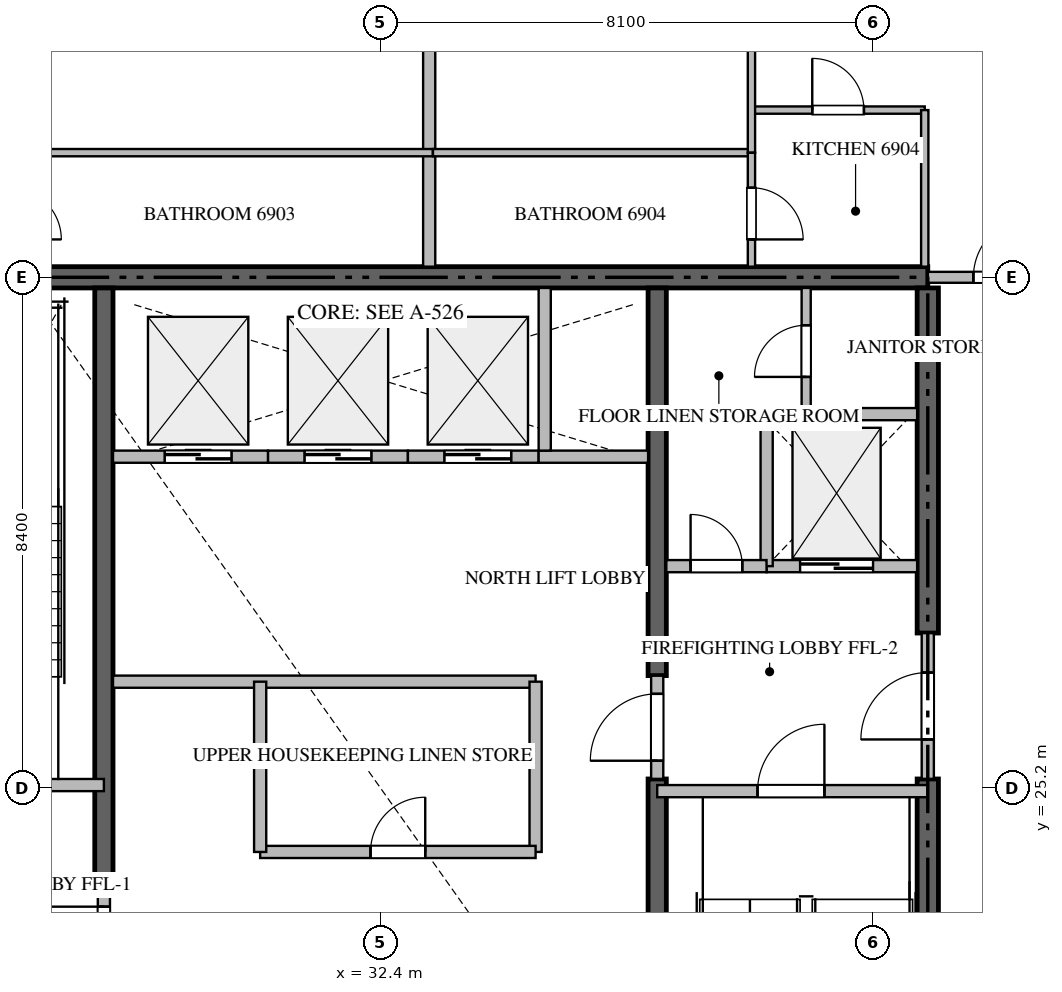
"""IFC4 building model, lengths in metres.
Left out: names, types, materials, properties, quantities, classifications, styles, units other than length and angle.
Written with IfcOpenShell. Run it as: python <this file> out.ifc"""

import sys

from ifc_helpers import new_model, si_unit, direction, frame, frame_2d, origin, place, context, subcontext, project, spatial, rectangle, extrude, source, transform, mapped, element, fill, save


model = new_model("IFC4")
c1 = context("Model", 3, precision=1e-05, world=origin(), true_north=direction((0.0, 1.0)))
c2 = subcontext(c1, "Body", "Model", "MODEL_VIEW")
j1 = project(units=[si_unit("LENGTHUNIT", "METRE"), si_unit("PLANEANGLEUNIT", "RADIAN")], contexts=[c1])
p1 = place(None, origin())
s1 = spatial("IfcSite", under=j1, at=p1, CompositionType="ELEMENT")
p2 = place(p1, origin())
s2 = spatial("IfcBuilding", under=s1, at=p2, CompositionType="ELEMENT")
p3 = place(p2, frame((0.0, 0.0, 275.9)))
s3 = spatial("IfcBuildingStorey", under=s2, at=p3, CompositionType="ELEMENT", Elevation=275.9)
p4 = place(p3, frame((41.4, 33.6, -0.26), z_axis=(0.0, 0.0, 1.0), x_axis=(-1.0, 0.0, 0.0)))
e1 = element("IfcWall", 1, at=p4, inside=s3, PredefinedType="SHEAR", context=c2, shape_type="SweptSolid", body=[
    extrude(rectangle(XDim=18.0, YDim=0.35, at=frame_2d((9.0, 0.0))), origin(), (0.0, 0.0, 1.0), 3.848),
])
p5 = place(p3, frame((41.4, 16.975, -0.26), z_axis=(0.0, 0.0, 1.0), x_axis=(0.0, 1.0, 0.0)))
e2 = element("IfcWall", 2, at=p5, inside=s3, PredefinedType="SHEAR", context=c2, shape_type="SweptSolid", body=[
    extrude(rectangle(XDim=8.375, YDim=0.35, at=frame_2d((4.188, 0.0))), origin(), (0.0, 0.0, 1.0), 3.848),
])
p6 = place(p3, frame((41.4, 27.75, -0.26), z_axis=(0.0, 0.0, 1.0), x_axis=(0.0, 1.0, 0.0)))
e3 = element("IfcWall", 3, at=p6, inside=s3, PredefinedType="SHEAR", context=c2, shape_type="SweptSolid", body=[
    extrude(rectangle(XDim=5.675, YDim=0.35, at=frame_2d((2.837, 0.0))), origin(), (0.0, 0.0, 1.0), 3.848),
])
p7 = place(p3, frame((27.85, 23.55, -0.26), z_axis=(0.0, 0.0, 1.0), x_axis=(0.0, 1.0, 0.0)))
e4 = element("IfcWall", 4, at=p7, inside=s3, PredefinedType="SHEAR", context=c2, shape_type="SweptSolid", body=[
    extrude(rectangle(XDim=9.875, YDim=0.3, at=frame_2d((4.938, 0.0))), origin(), (0.0, 0.0, 1.0), 3.848),
])
p8 = place(p3, frame((36.95, 16.975, -0.26), z_axis=(0.0, 0.0, 1.0), x_axis=(0.0, 1.0, 0.0)))
e5 = element("IfcWall", 5, at=p8, inside=s3, PredefinedType="SHEAR", context=c2, shape_type="SweptSolid", body=[
    extrude(rectangle(XDim=8.375, YDim=0.3, at=frame_2d((4.188, 0.0))), origin(), (0.0, 0.0, 1.0), 3.848),
])
p9 = place(p3, frame((36.95, 27.05, -0.26), z_axis=(0.0, 0.0, 1.0), x_axis=(0.0, 1.0, 0.0)))
e6 = element("IfcWall", 6, at=p9, inside=s3, PredefinedType="SHEAR", context=c2, shape_type="SweptSolid", body=[
    extrude(rectangle(XDim=6.375, YDim=0.3, at=frame_2d((3.188, 0.0))), origin(), (0.0, 0.0, 1.0), 3.848),
])
p10 = place(p3, frame((23.4, 25.25, 0.0), z_axis=(0.0, 0.0, 1.0), x_axis=(1.0, 0.0, 0.0)))
e7 = element("IfcWall", 7, at=p10, inside=s3, PredefinedType="STANDARD", context=c2, shape_type="SweptSolid", body=[
    extrude(rectangle(XDim=4.45, YDim=0.2, at=frame_2d((2.225, 0.0))), origin(), (0.0, 0.0, 1.0), 3.59),
])
p11 = place(p10, frame((1.65, 0.0, 0.0)))
e8 = element("IfcOpeningElement", 8, at=p11, cuts=e7, PredefinedType="OPENING", context=c2, shape_type="SweptSolid", body=[
    extrude(rectangle(XDim=1.1, YDim=2.15, at=frame_2d((0.55, 1.075))), frame((0.0, 0.11, 0.0), z_axis=(0.0, -1.0, 0.0), x_axis=(1.0, 0.0, 0.0)), (0.0, 0.0, 1.0), 0.22),
])
p12 = place(p3, frame((36.95, 25.15, 0.0), z_axis=(0.0, 0.0, 1.0), x_axis=(1.0, 0.0, 0.0)))
e9 = element("IfcWall", 9, at=p12, inside=s3, PredefinedType="STANDARD", context=c2, shape_type="SweptSolid", body=[
    extrude(rectangle(XDim=4.45, YDim=0.2, at=frame_2d((2.225, 0.0))), origin(), (0.0, 0.0, 1.0), 3.59),
])
p13 = place(p12, frame((1.65, 0.0, 0.0)))
e10 = element("IfcOpeningElement", 10, at=p13, cuts=e9, PredefinedType="OPENING", context=c2, shape_type="SweptSolid", body=[
    extrude(rectangle(XDim=1.1, YDim=2.15, at=frame_2d((0.55, 1.075))), frame((0.0, 0.11, 0.0), z_axis=(0.0, -1.0, 0.0), x_axis=(1.0, 0.0, 0.0)), (0.0, 0.0, 1.0), 0.22),
])
p14 = place(p3, frame((38.75, 28.85, 0.0), z_axis=(0.0, 0.0, 1.0), x_axis=(1.0, 0.0, 0.0)))
e11 = element("IfcWall", 11, at=p14, inside=s3, PredefinedType="STANDARD", context=c2, shape_type="SweptSolid", body=[
    extrude(rectangle(XDim=2.475, YDim=0.2, at=frame_2d((1.238, 0.0))), origin(), (0.0, 0.0, 1.0), 3.59),
])
p15 = place(p14, frame((0.55, 0.0, 0.0)))
e12 = element("IfcOpeningElement", 12, at=p15, cuts=e11, PredefinedType="OPENING", context=c2, shape_type="SweptSolid", body=[
    extrude(rectangle(XDim=1.2, YDim=2.2, at=frame_2d((0.6, 1.1))), frame((0.0, 0.11, 0.0), z_axis=(0.0, -1.0, 0.0), x_axis=(1.0, 0.0, 0.0)), (0.0, 0.0, 1.0), 0.22),
])
p16 = place(p3, frame((28.0, 30.65, 0.0), z_axis=(0.0, 0.0, 1.0), x_axis=(1.0, 0.0, 0.0)))
e13 = element("IfcWall", 13, at=p16, inside=s3, PredefinedType="STANDARD", context=c2, shape_type="SweptSolid", body=[
    extrude(rectangle(XDim=2.55, YDim=0.2, at=frame_2d((1.275, 0.0))), origin(), (0.0, 0.0, 1.0), 3.59),
])
p17 = place(p16, frame((0.85, 0.0, 0.0)))
e14 = element("IfcOpeningElement", 14, at=p17, cuts=e13, PredefinedType="OPENING", context=c2, shape_type="SweptSolid", body=[
    extrude(rectangle(XDim=1.1, YDim=2.2, at=frame_2d((0.55, 1.1))), frame((0.0, 0.11, 0.0), z_axis=(0.0, -1.0, 0.0), x_axis=(1.0, 0.0, 0.0)), (0.0, 0.0, 1.0), 0.22),
])
p18 = place(p3, frame((30.55, 30.65, 0.0), z_axis=(0.0, 0.0, 1.0), x_axis=(1.0, 0.0, 0.0)))
e15 = element("IfcWall", 15, at=p18, inside=s3, PredefinedType="STANDARD", context=c2, shape_type="SweptSolid", body=[
    extrude(rectangle(XDim=2.3, YDim=0.2, at=frame_2d((1.15, 0.0))), origin(), (0.0, 0.0, 1.0), 3.59),
])
p19 = place(p18, frame((0.6, 0.0, 0.0)))
e16 = element("IfcOpeningElement", 16, at=p19, cuts=e15, PredefinedType="OPENING", context=c2, shape_type="SweptSolid", body=[
    extrude(rectangle(XDim=1.1, YDim=2.2, at=frame_2d((0.55, 1.1))), frame((0.0, 0.11, 0.0), z_axis=(0.0, -1.0, 0.0), x_axis=(1.0, 0.0, 0.0)), (0.0, 0.0, 1.0), 0.22),
])
p20 = place(p3, frame((32.85, 30.65, 0.0), z_axis=(0.0, 0.0, 1.0), x_axis=(1.0, 0.0, 0.0)))
e17 = element("IfcWall", 17, at=p20, inside=s3, PredefinedType="STANDARD", context=c2, shape_type="SweptSolid", body=[
    extrude(rectangle(XDim=2.15, YDim=0.2, at=frame_2d((1.075, 0.0))), origin(), (0.0, 0.0, 1.0), 3.59),
])
p21 = place(p20, frame((0.6, 0.0, 0.0)))
e18 = element("IfcOpeningElement", 18, at=p21, cuts=e17, PredefinedType="OPENING", context=c2, shape_type="SweptSolid", body=[
    extrude(rectangle(XDim=1.1, YDim=2.2, at=frame_2d((0.55, 1.1))), frame((0.0, 0.11, 0.0), z_axis=(0.0, -1.0, 0.0), x_axis=(1.0, 0.0, 0.0)), (0.0, 0.0, 1.0), 0.22),
])
p22 = place(p3, frame((35.0, 30.65, 0.0), z_axis=(0.0, 0.0, 1.0), x_axis=(1.0, 0.0, 0.0)))
e19 = element("IfcWall", 19, at=p22, inside=s3, PredefinedType="STANDARD", context=c2, shape_type="SweptSolid", body=[
    extrude(rectangle(XDim=1.8, YDim=0.2, at=frame_2d((0.9, 0.0))), origin(), (0.0, 0.0, 1.0), 3.59),
])
p23 = place(p3, frame((35.1, 30.75, 0.0), z_axis=(0.0, 0.0, 1.0), x_axis=(0.0, 1.0, 0.0)))
e20 = element("IfcWall", 20, at=p23, inside=s3, PredefinedType="STANDARD", context=c2, shape_type="SweptSolid", body=[
    extrude(rectangle(XDim=2.675, YDim=0.2, at=frame_2d((1.337, 0.0))), origin(), (0.0, 0.0, 1.0), 3.59),
])
p24 = place(p3, frame((38.75, 28.85, 0.0), z_axis=(0.0, 0.0, 1.0), x_axis=(0.0, 1.0, 0.0)))
e21 = element("IfcWall", 21, at=p24, inside=s3, PredefinedType="STANDARD", context=c2, shape_type="SweptSolid", body=[
    extrude(rectangle(XDim=2.5, YDim=0.2, at=frame_2d((1.25, 0.0))), origin(), (0.0, 0.0, 1.0), 3.59),
])
p25 = place(p3, frame((38.75, 31.35, 0.0), z_axis=(0.0, 0.0, 1.0), x_axis=(1.0, 0.0, 0.0)))
e22 = element("IfcWall", 22, at=p25, inside=s3, PredefinedType="STANDARD", context=c2, shape_type="SweptSolid", body=[
    extrude(rectangle(XDim=2.475, YDim=0.2, at=frame_2d((1.238, 0.0))), origin(), (0.0, 0.0, 1.0), 3.59),
])
p26 = place(p3, frame((37.1, 28.85, 0.0), z_axis=(0.0, 0.0, 1.0), x_axis=(1.0, 0.0, 0.0)))
e23 = element("IfcWall", 23, at=p26, inside=s3, PredefinedType="STANDARD", context=c2, shape_type="SweptSolid", body=[
    extrude(rectangle(XDim=1.648, YDim=0.2, at=frame_2d((0.824, 0.0))), origin(), (0.0, 0.0, 1.0), 3.59),
])
p27 = place(p26, frame((0.399, 0.0, 0.0)))
e24 = element("IfcOpeningElement", 24, at=p27, cuts=e23, PredefinedType="OPENING", context=c2, shape_type="SweptSolid", body=[
    extrude(rectangle(XDim=0.85, YDim=2.1, at=frame_2d((0.425, 1.05))), frame((0.0, 0.11, 0.0), z_axis=(0.0, -1.0, 0.0), x_axis=(1.0, 0.0, 0.0)), (0.0, 0.0, 1.0), 0.22),
])
p28 = place(p3, frame((41.4, 25.352, 0.0), z_axis=(0.0, 0.0, 1.0), x_axis=(0.0, 1.0, 0.0)))
e25 = element("IfcWall", 25, at=p28, inside=s3, PredefinedType="STANDARD", context=c2, shape_type="SweptSolid", body=[
    extrude(rectangle(XDim=2.396, YDim=0.2, at=frame_2d((1.198, 0.0))), origin(), (0.0, 0.0, 1.0), 3.59),
])
p29 = place(p28, frame((0.648, 0.0, 0.0)))
e26 = element("IfcOpeningElement", 26, at=p29, cuts=e25, PredefinedType="OPENING", context=c2, shape_type="SweptSolid", body=[
    extrude(rectangle(XDim=1.1, YDim=2.15, at=frame_2d((0.55, 1.075))), frame((0.0, 0.11, 0.0), z_axis=(0.0, -1.0, 0.0), x_axis=(1.0, 0.0, 0.0)), (0.0, 0.0, 1.0), 0.22),
])
p30 = place(p3, frame((27.85, 21.852, 0.0), z_axis=(0.0, 0.0, 1.0), x_axis=(0.0, 1.0, 0.0)))
e27 = element("IfcWall", 27, at=p30, inside=s3, PredefinedType="STANDARD", context=c2, shape_type="SweptSolid", body=[
    extrude(rectangle(XDim=1.696, YDim=0.2, at=frame_2d((0.848, 0.0))), origin(), (0.0, 0.0, 1.0), 3.59),
])
p31 = place(p30, frame((0.298, 0.0, 0.0)))
e28 = element("IfcOpeningElement", 28, at=p31, cuts=e27, PredefinedType="OPENING", context=c2, shape_type="SweptSolid", body=[
    extrude(rectangle(XDim=1.1, YDim=2.15, at=frame_2d((0.55, 1.075))), frame((0.0, 0.11, 0.0), z_axis=(0.0, -1.0, 0.0), x_axis=(1.0, 0.0, 0.0)), (0.0, 0.0, 1.0), 0.22),
])
p32 = place(p3, frame((36.95, 25.352, 0.0), z_axis=(0.0, 0.0, 1.0), x_axis=(0.0, 1.0, 0.0)))
e29 = element("IfcWall", 29, at=p32, inside=s3, PredefinedType="STANDARD", context=c2, shape_type="SweptSolid", body=[
    extrude(rectangle(XDim=1.696, YDim=0.2, at=frame_2d((0.848, 0.0))), origin(), (0.0, 0.0, 1.0), 3.59),
])
p33 = place(p32, frame((0.298, 0.0, 0.0)))
e30 = element("IfcOpeningElement", 30, at=p33, cuts=e29, PredefinedType="OPENING", context=c2, shape_type="SweptSolid", body=[
    extrude(rectangle(XDim=1.1, YDim=2.15, at=frame_2d((0.55, 1.075))), frame((0.0, 0.11, 0.0), z_axis=(0.0, -1.0, 0.0), x_axis=(1.0, 0.0, 0.0)), (0.0, 0.0, 1.0), 0.22),
])
p34 = place(p3, frame((39.4, 31.35, 0.0), z_axis=(0.0, 0.0, 1.0), x_axis=(0.0, 1.0, 0.0)))
e31 = element("IfcWall", 31, at=p34, inside=s3, PredefinedType="PARTITIONING", context=c2, shape_type="SweptSolid", body=[
    extrude(rectangle(XDim=2.075, YDim=0.15, at=frame_2d((1.038, 0.0))), origin(), (0.0, 0.0, 1.0), 3.59),
])
p35 = place(p34, frame((0.612, 0.0, 0.0)))
e32 = element("IfcOpeningElement", 32, at=p35, cuts=e31, PredefinedType="OPENING", context=c2, shape_type="SweptSolid", body=[
    extrude(rectangle(XDim=0.85, YDim=2.1, at=frame_2d((0.425, 1.05))), frame((0.0, 0.085, 0.0), z_axis=(0.0, -1.0, 0.0), x_axis=(1.0, 0.0, 0.0)), (0.0, 0.0, 1.0), 0.17),
])
p36 = place(p3, frame((28.0, 26.95, 0.0), z_axis=(0.0, 0.0, 1.0), x_axis=(1.0, 0.0, 0.0)))
e33 = element("IfcWall", 33, at=p36, inside=s3, PredefinedType="STANDARD", context=c2, shape_type="SweptSolid", body=[
    extrude(rectangle(XDim=6.95, YDim=0.2, at=frame_2d((3.475, 0.0))), origin(), (0.0, 0.0, 1.0), 3.59),
])
p37 = place(p3, frame((34.95, 24.15, 0.0), z_axis=(0.0, 0.0, 1.0), x_axis=(0.0, 1.0, 0.0)))
e34 = element("IfcWall", 34, at=p37, inside=s3, PredefinedType="STANDARD", context=c2, shape_type="SweptSolid", body=[
    extrude(rectangle(XDim=2.8, YDim=0.2, at=frame_2d((1.4, 0.0))), origin(), (0.0, 0.0, 1.0), 3.59),
])
p38 = place(p3, frame((30.42, 24.15, 0.0), z_axis=(0.0, 0.0, 1.0), x_axis=(1.0, 0.0, 0.0)))
e35 = element("IfcWall", 35, at=p38, inside=s3, PredefinedType="STANDARD", context=c2, shape_type="SweptSolid", body=[
    extrude(rectangle(XDim=4.53, YDim=0.2, at=frame_2d((2.265, 0.0))), origin(), (0.0, 0.0, 1.0), 3.59),
])
p39 = place(p38, frame((1.815, 0.0, 0.0)))
e36 = element("IfcOpeningElement", 36, at=p39, cuts=e35, PredefinedType="OPENING", context=c2, shape_type="SweptSolid", body=[
    extrude(rectangle(XDim=0.9, YDim=2.1, at=frame_2d((0.45, 1.05))), frame((0.0, 0.11, 0.0), z_axis=(0.0, -1.0, 0.0), x_axis=(1.0, 0.0, 0.0)), (0.0, 0.0, 1.0), 0.22),
])
p40 = place(p3, frame((30.42, 24.15, 0.0), z_axis=(0.0, 0.0, 1.0), x_axis=(0.0, 1.0, 0.0)))
e37 = element("IfcWall", 37, at=p40, inside=s3, PredefinedType="STANDARD", context=c2, shape_type="SweptSolid", body=[
    extrude(rectangle(XDim=2.8, YDim=0.2, at=frame_2d((1.4, 0.0))), origin(), (0.0, 0.0, 1.0), 3.59),
])
p41 = place(p3, frame((33.2, 33.775, 0.0), z_axis=(0.0, 0.0, 1.0), x_axis=(0.0, 1.0, 0.0)))
e38 = element("IfcWall", 38, at=p41, inside=s3, PredefinedType="PARTITIONING", context=c2, shape_type="SweptSolid", body=[
    extrude(rectangle(XDim=15.343, YDim=0.2, at=frame_2d((7.671, 0.0))), origin(), (0.0, 0.0, 1.0), 3.59),
])
p42 = place(p3, frame((41.402, 33.6, 0.0), z_axis=(0.0, 0.0, 1.0), x_axis=(1.0, 0.0, 0.0)))
e39 = element("IfcWall", 39, at=p42, inside=s3, PredefinedType="PARTITIONING", context=c2, shape_type="SweptSolid", body=[
    extrude(rectangle(XDim=2.496, YDim=0.18, at=frame_2d((1.248, 0.0))), origin(), (0.0, 0.0, 1.0), 3.59),
])
p43 = place(p42, frame((0.748, 0.0, 0.0)))
e40 = element("IfcOpeningElement", 40, at=p43, cuts=e39, PredefinedType="OPENING", context=c2, shape_type="SweptSolid", body=[
    extrude(rectangle(XDim=1.0, YDim=2.15, at=frame_2d((0.5, 1.075))), frame((0.0, 0.1, 0.0), z_axis=(0.0, -1.0, 0.0), x_axis=(1.0, 0.0, 0.0)), (0.0, 0.0, 1.0), 0.2),
])
p44 = place(p3, frame((26.3, 35.65, 0.0), z_axis=(0.0, 0.0, 1.0), x_axis=(1.0, 0.0, 0.0)))
e41 = element("IfcWall", 41, at=p44, inside=s3, PredefinedType="PARTITIONING", context=c2, shape_type="SweptSolid", body=[
    extrude(rectangle(XDim=6.96, YDim=0.12, at=frame_2d((3.48, 0.0))), origin(), (0.0, 0.0, 1.0), 3.59),
])
p45 = place(p3, frame((38.5, 36.35, 0.0), z_axis=(0.0, 0.0, 1.0), x_axis=(1.0, 0.0, 0.0)))
e42 = element("IfcWall", 42, at=p45, inside=s3, PredefinedType="PARTITIONING", context=c2, shape_type="SweptSolid", body=[
    extrude(rectangle(XDim=2.85, YDim=0.12, at=frame_2d((1.425, 0.0))), origin(), (0.0, 0.0, 1.0), 3.59),
])
p46 = place(p45, frame((1.0, 0.0, 0.0)))
e43 = element("IfcOpeningElement", 43, at=p46, cuts=e42, PredefinedType="OPENING", context=c2, shape_type="SweptSolid", body=[
    extrude(rectangle(XDim=0.85, YDim=2.1, at=frame_2d((0.425, 1.05))), frame((0.0, 0.07, 0.0), z_axis=(0.0, -1.0, 0.0), x_axis=(1.0, 0.0, 0.0)), (0.0, 0.0, 1.0), 0.14),
])
p47 = place(p3, frame((41.35, 36.35, 0.0), z_axis=(0.0, 0.0, 1.0), x_axis=(0.0, -1.0, 0.0)))
e44 = element("IfcWall", 44, at=p47, inside=s3, PredefinedType="PARTITIONING", context=c2, shape_type="SweptSolid", body=[
    extrude(rectangle(XDim=2.575, YDim=0.12, at=frame_2d((1.288, 0.0))), origin(), (0.0, 0.0, 1.0), 3.59),
])
p48 = place(p3, frame((33.262, 35.65, 0.0), z_axis=(0.0, 0.0, 1.0), x_axis=(1.0, 0.0, 0.0)))
e45 = element("IfcWall", 45, at=p48, inside=s3, PredefinedType="PARTITIONING", context=c2, shape_type="SweptSolid", body=[
    extrude(rectangle(XDim=5.238, YDim=0.12, at=frame_2d((2.619, 0.0))), origin(), (0.0, 0.0, 1.0), 3.59),
])
p49 = place(p3, frame((38.5, 41.112, 0.0), z_axis=(0.0, 0.0, 1.0), x_axis=(0.0, -1.0, 0.0)))
e46 = element("IfcWall", 46, at=p49, inside=s3, PredefinedType="PARTITIONING", context=c2, shape_type="SweptSolid", body=[
    extrude(rectangle(XDim=5.462, YDim=0.12, at=frame_2d((2.731, 0.0))), origin(), (0.0, 0.0, 1.0), 3.59),
])
p50 = place(p49, frame((2.306, 0.0, 0.0)))
e47 = element("IfcOpeningElement", 47, at=p50, cuts=e46, PredefinedType="OPENING", context=c2, shape_type="SweptSolid", body=[
    extrude(rectangle(XDim=0.85, YDim=2.1, at=frame_2d((0.425, 1.05))), frame((0.0, 0.07, 0.0), z_axis=(0.0, -1.0, 0.0), x_axis=(1.0, 0.0, 0.0)), (0.0, 0.0, 1.0), 0.14),
])
p51 = place(p3, frame((38.5, 35.648, 0.0), z_axis=(0.0, 0.0, 1.0), x_axis=(0.0, -1.0, 0.0)))
e48 = element("IfcWall", 48, at=p51, inside=s3, PredefinedType="PARTITIONING", context=c2, shape_type="SweptSolid", body=[
    extrude(rectangle(XDim=1.873, YDim=0.12, at=frame_2d((0.937, 0.0))), origin(), (0.0, 0.0, 1.0), 3.59),
])
p52 = place(p51, frame((0.575, 0.0, 0.0)))
e49 = element("IfcOpeningElement", 49, at=p52, cuts=e48, PredefinedType="OPENING", context=c2, shape_type="SweptSolid", body=[
    extrude(rectangle(XDim=0.85, YDim=2.1, at=frame_2d((0.425, 1.05))), frame((0.0, 0.07, 0.0), z_axis=(0.0, -1.0, 0.0), x_axis=(1.0, 0.0, 0.0)), (0.0, 0.0, 1.0), 0.14),
])
m1 = source(origin(), c2, "Body", "SweptSolid", [
    extrude(rectangle(XDim=1.1, YDim=2.15, at=frame_2d((0.55, 1.075))), frame((0.0, 0.025, 0.0), z_axis=(0.0, -1.0, 0.0), x_axis=(1.0, 0.0, 0.0)), (0.0, 0.0, 1.0), 0.05),
])
p53 = place(p13, origin())
e50 = element("IfcDoor", 50, at=p53, inside=s3, OperationType="SINGLE_SWING_RIGHT", PredefinedType="DOOR", context=c2, shape_type="MappedRepresentation", body=[
    mapped(m1, transform((0.0, 0.0, 0.0), scale=1.0)),
])
fill(e10, e50)
m2 = source(origin(), c2, "Body", "SweptSolid", [
    extrude(rectangle(XDim=1.2, YDim=2.2, at=frame_2d((0.6, 1.1))), frame((0.0, 0.025, 0.0), z_axis=(0.0, -1.0, 0.0), x_axis=(1.0, 0.0, 0.0)), (0.0, 0.0, 1.0), 0.05),
])
p54 = place(p15, origin())
e51 = element("IfcDoor", 51, at=p54, inside=s3, OperationType="DOUBLE_DOOR_SLIDING", PredefinedType="DOOR", context=c2, shape_type="MappedRepresentation", body=[
    mapped(m2, transform((0.0, 0.0, 0.0), scale=1.0)),
])
fill(e12, e51)
m3 = source(origin(), c2, "Body", "SweptSolid", [
    extrude(rectangle(XDim=1.1, YDim=2.2, at=frame_2d((0.55, 1.1))), frame((0.0, 0.025, 0.0), z_axis=(0.0, -1.0, 0.0), x_axis=(1.0, 0.0, 0.0)), (0.0, 0.0, 1.0), 0.05),
])
p55 = place(p17, origin())
e52 = element("IfcDoor", 52, at=p55, inside=s3, OperationType="DOUBLE_DOOR_SLIDING", PredefinedType="DOOR", context=c2, shape_type="MappedRepresentation", body=[
    mapped(m3, transform((0.0, 0.0, 0.0), scale=1.0)),
])
fill(e14, e52)
p56 = place(p19, origin())
e53 = element("IfcDoor", 53, at=p56, inside=s3, OperationType="DOUBLE_DOOR_SLIDING", PredefinedType="DOOR", context=c2, shape_type="MappedRepresentation", body=[
    mapped(m3, transform((0.0, 0.0, 0.0), scale=1.0)),
])
fill(e16, e53)
p57 = place(p21, origin())
e54 = element("IfcDoor", 54, at=p57, inside=s3, OperationType="DOUBLE_DOOR_SLIDING", PredefinedType="DOOR", context=c2, shape_type="MappedRepresentation", body=[
    mapped(m3, transform((0.0, 0.0, 0.0), scale=1.0)),
])
fill(e18, e54)
m4 = source(origin(), c2, "Body", "SweptSolid", [
    extrude(rectangle(XDim=0.85, YDim=2.1, at=frame_2d((0.425, 1.05))), frame((0.0, 0.025, 0.0), z_axis=(0.0, -1.0, 0.0), x_axis=(1.0, 0.0, 0.0)), (0.0, 0.0, 1.0), 0.05),
])
p58 = place(p27, origin())
e55 = element("IfcDoor", 55, at=p58, inside=s3, OperationType="SINGLE_SWING_LEFT", PredefinedType="DOOR", context=c2, shape_type="MappedRepresentation", body=[
    mapped(m4, transform((0.0, 0.0, 0.0), scale=1.0)),
])
fill(e24, e55)
p59 = place(p29, origin())
e56 = element("IfcDoor", 56, at=p59, inside=s3, OperationType="SINGLE_SWING_LEFT", PredefinedType="DOOR", context=c2, shape_type="MappedRepresentation", body=[
    mapped(m1, transform((0.0, 0.0, 0.0), scale=1.0)),
])
fill(e26, e56)
p60 = place(p31, origin())
e57 = element("IfcDoor", 57, at=p60, inside=s3, OperationType="SINGLE_SWING_RIGHT", PredefinedType="DOOR", context=c2, shape_type="MappedRepresentation", body=[
    mapped(m1, transform((0.0, 0.0, 0.0), scale=1.0)),
])
fill(e28, e57)
p61 = place(p33, origin())
e58 = element("IfcDoor", 58, at=p61, inside=s3, OperationType="SINGLE_SWING_LEFT", PredefinedType="DOOR", context=c2, shape_type="MappedRepresentation", body=[
    mapped(m1, transform((0.0, 0.0, 0.0), scale=1.0)),
])
fill(e30, e58)
p62 = place(p35, origin())
e59 = element("IfcDoor", 59, at=p62, inside=s3, OperationType="SINGLE_SWING_LEFT", PredefinedType="DOOR", context=c2, shape_type="MappedRepresentation", body=[
    mapped(m4, transform((0.0, 0.0, 0.0), scale=1.0)),
])
fill(e32, e59)
m5 = source(origin(), c2, "Body", "SweptSolid", [
    extrude(rectangle(XDim=0.9, YDim=2.1, at=frame_2d((0.45, 1.05))), frame((0.0, 0.025, 0.0), z_axis=(0.0, -1.0, 0.0), x_axis=(1.0, 0.0, 0.0)), (0.0, 0.0, 1.0), 0.05),
])
p63 = place(p39, origin())
e60 = element("IfcDoor", 60, at=p63, inside=s3, OperationType="SINGLE_SWING_RIGHT", PredefinedType="DOOR", context=c2, shape_type="MappedRepresentation", body=[
    mapped(m5, transform((0.0, 0.0, 0.0), scale=1.0)),
])
fill(e36, e60)
m6 = source(origin(), c2, "Body", "SweptSolid", [
    extrude(rectangle(XDim=1.0, YDim=2.15, at=frame_2d((0.5, 1.075))), frame((0.0, 0.025, 0.0), z_axis=(0.0, -1.0, 0.0), x_axis=(1.0, 0.0, 0.0)), (0.0, 0.0, 1.0), 0.05),
])
p64 = place(p43, origin())
e61 = element("IfcDoor", 61, at=p64, inside=s3, OperationType="SINGLE_SWING_RIGHT", PredefinedType="DOOR", context=c2, shape_type="MappedRepresentation", body=[
    mapped(m6, transform((0.0, 0.0, 0.0), scale=1.0)),
])
fill(e40, e61)
p65 = place(p46, origin())
e62 = element("IfcDoor", 62, at=p65, inside=s3, OperationType="SINGLE_SWING_LEFT", PredefinedType="DOOR", context=c2, shape_type="MappedRepresentation", body=[
    mapped(m4, transform((0.0, 0.0, 0.0), scale=1.0)),
])
fill(e43, e62)
p66 = place(p52, origin())
e63 = element("IfcDoor", 63, at=p66, inside=s3, OperationType="SINGLE_SWING_RIGHT", PredefinedType="DOOR", context=c2, shape_type="MappedRepresentation", body=[
    mapped(m4, transform((0.0, 0.0, 0.0), scale=1.0)),
])
fill(e49, e63)
save(model, sys.argv[1])
